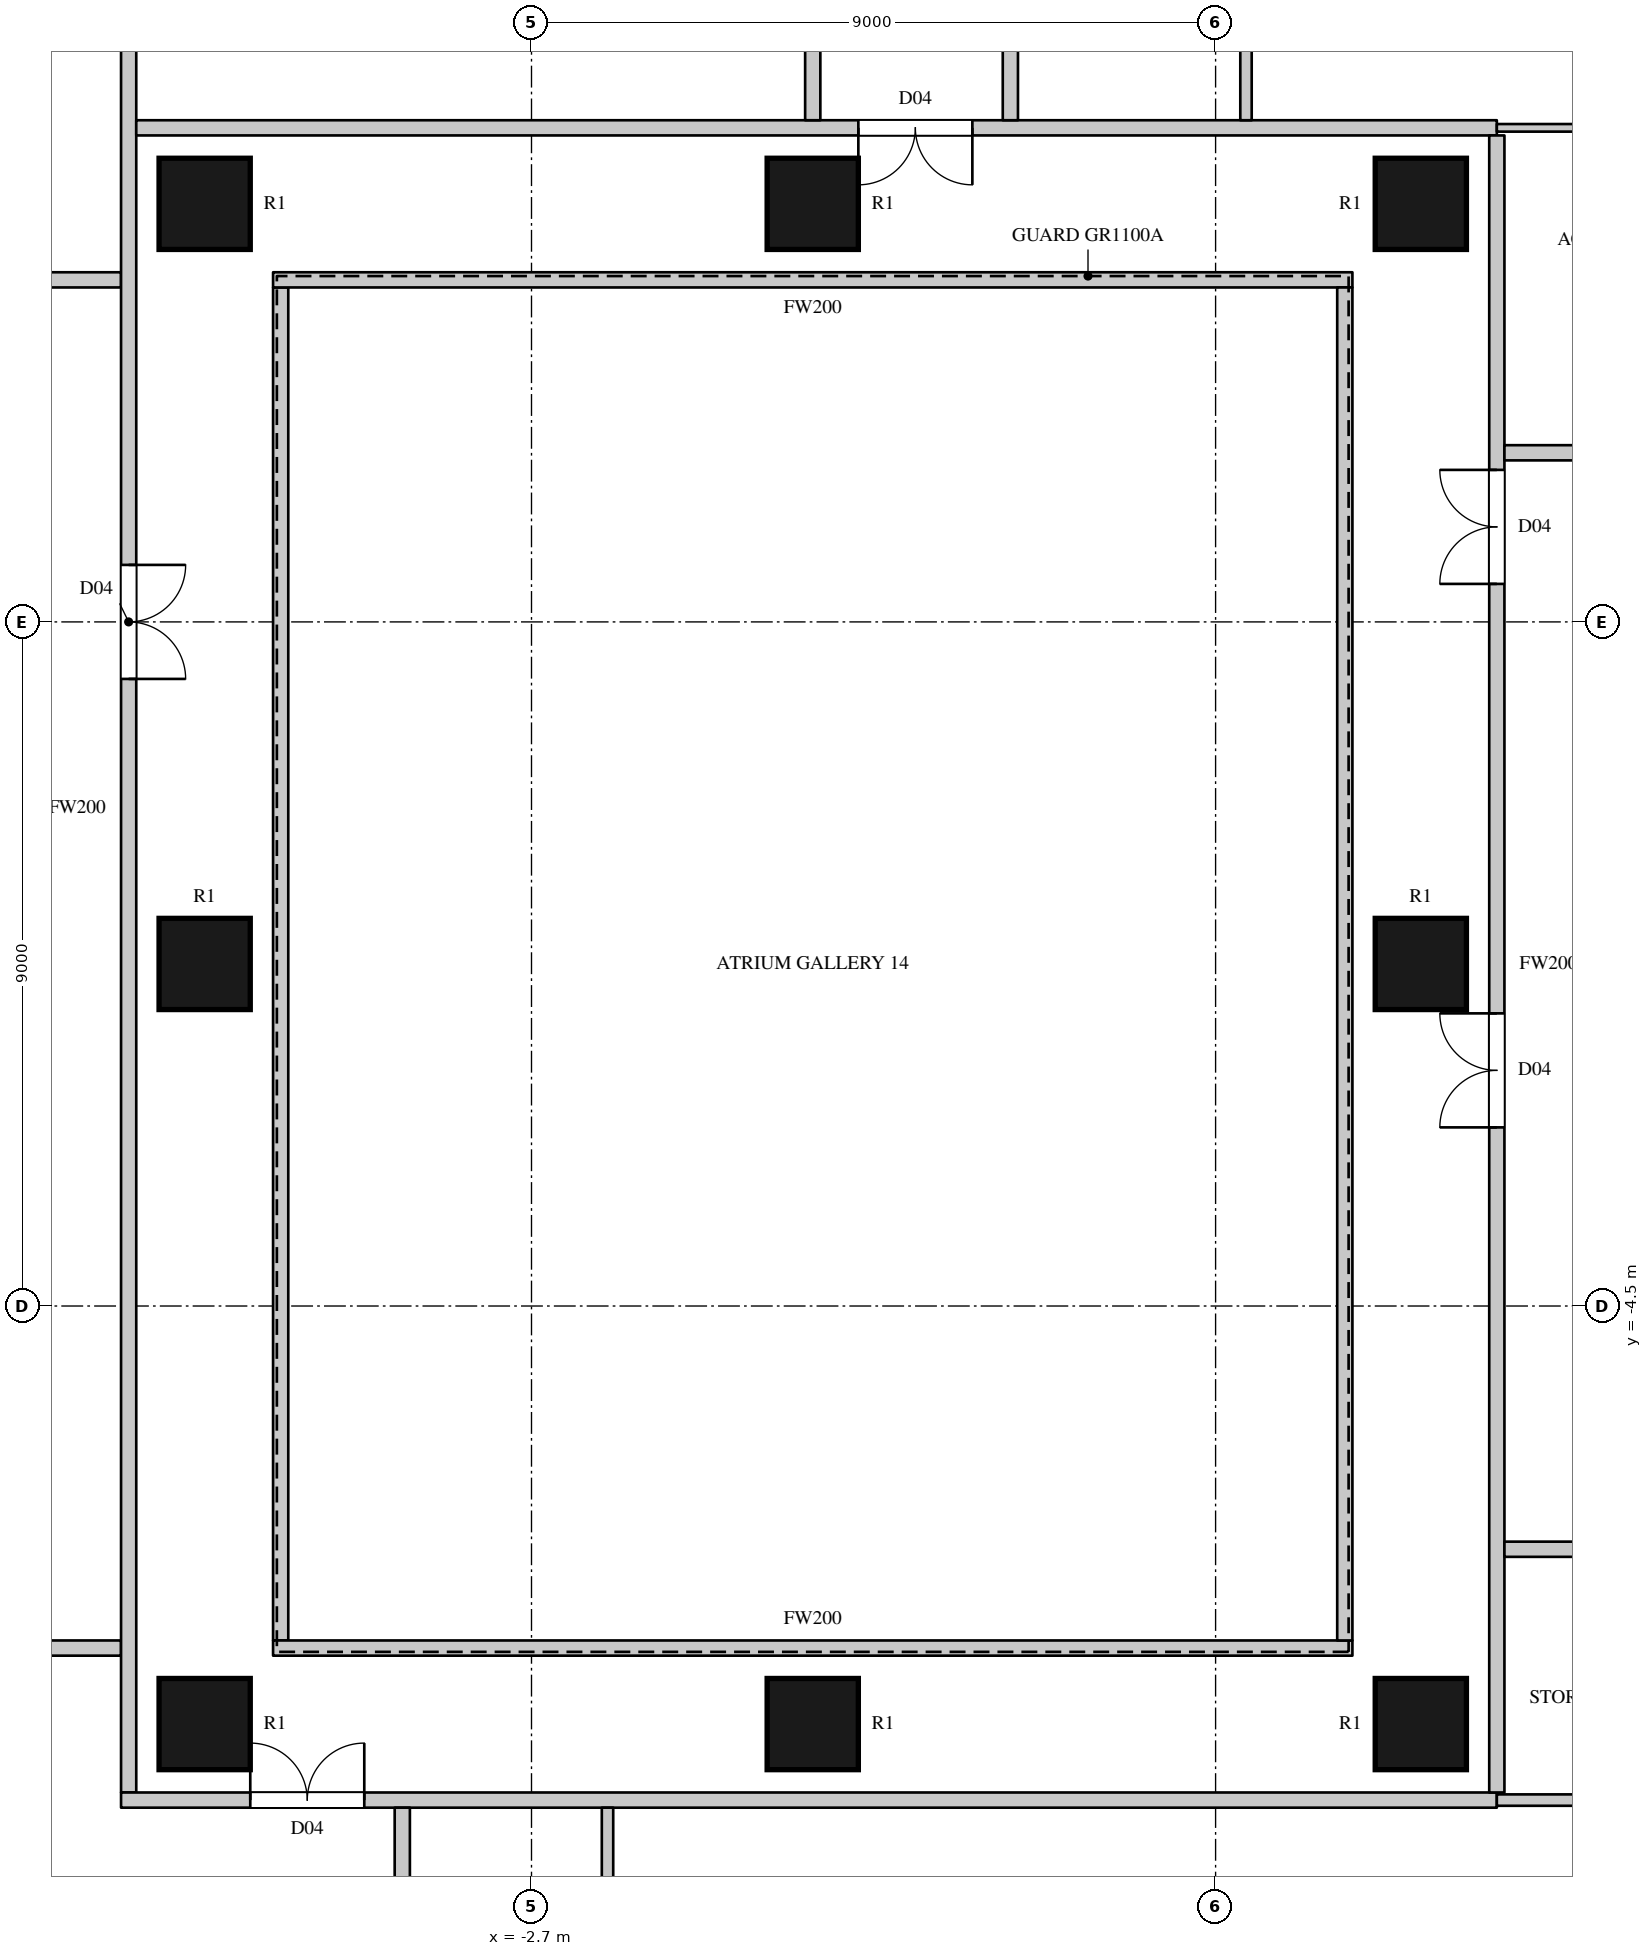
"""IFC4 building model, lengths in metres.
Left out: names, types, materials, properties, quantities, classifications, styles, units other than length and angle.
Written with IfcOpenShell. Run it as: python <this file> out.ifc"""

import sys

from ifc_helpers import new_model, si_unit, direction, frame, frame_2d, origin, origin_2d, place, context, subcontext, project, spatial, rectangle, circle, extrude, element, fill, save


model = new_model("IFC4")
c1 = context("Model", 3, precision=1e-05, world=origin(), true_north=direction((0.0, 1.0)))
c2 = subcontext(c1, "Body", "Model", "MODEL_VIEW")
j1 = project(units=[si_unit("LENGTHUNIT", "METRE"), si_unit("PLANEANGLEUNIT", "RADIAN")], contexts=[c1])
p1 = place(None, origin())
s1 = spatial("IfcSite", under=j1, at=p1, CompositionType="ELEMENT")
p2 = place(p1, origin())
s2 = spatial("IfcBuilding", under=s1, at=p2, CompositionType="ELEMENT")
p3 = place(p2, frame((0.0, 0.0, 80.7)))
s3 = spatial("IfcBuildingStorey", under=s2, at=p3, CompositionType="ELEMENT", Elevation=80.7)
for number, where, z_axis, x_axis in (
    (1, (-7.0, -10.0, 0.0), (0.0, 0.0, 1.0), (1.0, 0.0, 0.0)),
    (2, (-7.0, 0.0, 0.0), (0.0, 0.0, 1.0), (1.0, 0.0, 0.0)),
    (3, (-7.0, 10.0, 0.0), (0.0, 0.0, 1.0), (1.0, 0.0, 0.0)),
    (4, (1.0, -10.0, 0.0), (0.0, 0.0, 1.0), (1.0, 0.0, 0.0)),
    (5, (1.0, 10.0, 0.0), (0.0, 0.0, 1.0), (1.0, 0.0, 0.0)),
    (6, (9.0, -10.0, 0.0), (0.0, 0.0, 1.0), (1.0, 0.0, 0.0)),
    (7, (9.0, 0.0, 0.0), (0.0, 0.0, 1.0), (1.0, 0.0, 0.0)),
    (8, (9.0, 10.0, 0.0), (0.0, 0.0, 1.0), (1.0, 0.0, 0.0)),
):
    element("IfcColumn", number, at=place(p3, frame(where, z_axis=z_axis, x_axis=x_axis)), inside=s3, PredefinedType="COLUMN", context=c2, shape_type="SweptSolid", body=[
        extrude(circle(Radius=0.6, at=origin_2d()), origin(), (0.0, 0.0, 1.0), 3.6),
    ])
p4 = place(p3, frame((-13.97, -9.0, 0.0), z_axis=(0.0, 0.0, 1.0), x_axis=(1.0, 0.0, 0.0)))
e9 = element("IfcWall", 9, at=p4, inside=s3, PredefinedType="PARTITIONING", context=c2, shape_type="SweptSolid", body=[
    extrude(rectangle(XDim=5.87, YDim=0.2, at=frame_2d((2.935, 0.0))), origin(), (0.0, 0.0, 1.0), 3.3),
])
p5 = place(p4, frame((0.4, 0.0, 0.0)))
e10 = element("IfcOpeningElement", 10, at=p5, cuts=e9, PredefinedType="OPENING", context=c2, shape_type="SweptSolid", body=[
    extrude(rectangle(XDim=1.5, YDim=2.2, at=frame_2d((0.75, 1.1))), frame((0.0, 0.11, 0.0), z_axis=(0.0, -1.0, 0.0), x_axis=(1.0, 0.0, 0.0)), (0.0, 0.0, 1.0), 0.22),
])
p6 = place(p4, frame((2.05, 0.0, 0.0)))
e11 = element("IfcOpeningElement", 11, at=p6, cuts=e9, PredefinedType="OPENING", context=c2, shape_type="SweptSolid", body=[
    extrude(rectangle(XDim=1.5, YDim=2.2, at=frame_2d((0.75, 1.1))), frame((0.0, 0.11, 0.0), z_axis=(0.0, -1.0, 0.0), x_axis=(1.0, 0.0, 0.0)), (0.0, 0.0, 1.0), 0.22),
])
p7 = place(p3, frame((-13.97, 9.0, 0.0), z_axis=(0.0, 0.0, 1.0), x_axis=(1.0, 0.0, 0.0)))
e12 = element("IfcWall", 12, at=p7, inside=s3, PredefinedType="PARTITIONING", context=c2, shape_type="SweptSolid", body=[
    extrude(rectangle(XDim=5.87, YDim=0.2, at=frame_2d((2.935, 0.0))), origin(), (0.0, 0.0, 1.0), 3.3),
])
p8 = place(p3, frame((-8.0, -10.9, 0.0), z_axis=(0.0, 0.0, 1.0), x_axis=(0.0, 1.0, 0.0)))
e13 = element("IfcWall", 13, at=p8, inside=s3, PredefinedType="PARTITIONING", context=c2, shape_type="SweptSolid", body=[
    extrude(rectangle(XDim=25.9, YDim=0.2, at=frame_2d((12.95, 0.0))), origin(), (0.0, 0.0, 1.0), 3.3),
])
p9 = place(p8, frame((14.65, 0.0, 0.0)))
e14 = element("IfcOpeningElement", 14, at=p9, cuts=e13, PredefinedType="OPENING", context=c2, shape_type="SweptSolid", body=[
    extrude(rectangle(XDim=1.5, YDim=2.2, at=frame_2d((0.75, 1.1))), frame((0.0, 0.11, 0.0), z_axis=(0.0, -1.0, 0.0), x_axis=(1.0, 0.0, 0.0)), (0.0, 0.0, 1.0), 0.22),
])
p10 = place(p8, frame((24.15, 0.0, 0.0)))
e15 = element("IfcOpeningElement", 15, at=p10, cuts=e13, PredefinedType="OPENING", context=c2, shape_type="SweptSolid", body=[
    extrude(rectangle(XDim=1.6, YDim=2.4, at=frame_2d((0.8, 1.2))), frame((0.0, 0.11, 0.0), z_axis=(0.0, -1.0, 0.0), x_axis=(1.0, 0.0, 0.0)), (0.0, 0.0, 1.0), 0.22),
])
p11 = place(p3, frame((-8.1, -11.0, 0.0), z_axis=(0.0, 0.0, 1.0), x_axis=(1.0, 0.0, 0.0)))
e16 = element("IfcWall", 16, at=p11, inside=s3, PredefinedType="PARTITIONING", context=c2, shape_type="SweptSolid", body=[
    extrude(rectangle(XDim=18.1, YDim=0.2, at=frame_2d((9.05, 0.0))), origin(), (0.0, 0.0, 1.0), 3.3),
])
p12 = place(p11, frame((1.7, 0.0, 0.0)))
e17 = element("IfcOpeningElement", 17, at=p12, cuts=e16, PredefinedType="OPENING", context=c2, shape_type="SweptSolid", body=[
    extrude(rectangle(XDim=1.5, YDim=2.2, at=frame_2d((0.75, 1.1))), frame((0.0, 0.11, 0.0), z_axis=(0.0, -1.0, 0.0), x_axis=(1.0, 0.0, 0.0)), (0.0, 0.0, 1.0), 0.22),
])
p13 = place(p3, frame((-7.9, 11.0, 0.0), z_axis=(0.0, 0.0, 1.0), x_axis=(1.0, 0.0, 0.0)))
e18 = element("IfcWall", 18, at=p13, inside=s3, PredefinedType="PARTITIONING", context=c2, shape_type="SweptSolid", body=[
    extrude(rectangle(XDim=17.9, YDim=0.2, at=frame_2d((8.95, 0.0))), origin(), (0.0, 0.0, 1.0), 3.3),
])
p14 = place(p13, frame((9.5, 0.0, 0.0)))
e19 = element("IfcOpeningElement", 19, at=p14, cuts=e18, PredefinedType="OPENING", context=c2, shape_type="SweptSolid", body=[
    extrude(rectangle(XDim=1.5, YDim=2.2, at=frame_2d((0.75, 1.1))), frame((0.0, 0.11, 0.0), z_axis=(0.0, -1.0, 0.0), x_axis=(1.0, 0.0, 0.0)), (0.0, 0.0, 1.0), 0.22),
])
p15 = place(p3, frame((-6.0, -8.9, 0.0), z_axis=(0.0, 0.0, 1.0), x_axis=(0.0, 1.0, 0.0)))
e20 = element("IfcWall", 20, at=p15, inside=s3, PredefinedType="PARTITIONING", context=c2, shape_type="SweptSolid", body=[
    extrude(rectangle(XDim=17.8, YDim=0.2, at=frame_2d((8.9, 0.0))), origin(), (0.0, 0.0, 1.0), 3.3),
])
for number, where, z_axis, x_axis in (
    (21, (-6.1, -9.0, 0.0), (0.0, 0.0, 1.0), (1.0, 0.0, 0.0)),
    (22, (-6.1, 9.0, 0.0), (0.0, 0.0, 1.0), (1.0, 0.0, 0.0)),
):
    element("IfcWall", number, at=place(p3, frame(where, z_axis=z_axis, x_axis=x_axis)), inside=s3, PredefinedType="PARTITIONING", context=c2, shape_type="SweptSolid", body=[
        extrude(rectangle(XDim=14.2, YDim=0.2, at=frame_2d((7.1, 0.0))), origin(), (0.0, 0.0, 1.0), 3.3),
    ])
p16 = place(p3, frame((-4.4, -15.0, 0.0), z_axis=(0.0, 0.0, 1.0), x_axis=(0.0, 1.0, 0.0)))
e23 = element("IfcWall", 23, at=p16, inside=s3, PredefinedType="PARTITIONING", context=c2, shape_type="SweptSolid", body=[
    extrude(rectangle(XDim=3.9, YDim=0.2, at=frame_2d((1.95, 0.0))), origin(), (0.0, 0.0, 1.0), 3.3),
])
p17 = place(p16, frame((0.15, 0.0, 0.0)))
e24 = element("IfcOpeningElement", 24, at=p17, cuts=e23, PredefinedType="OPENING", context=c2, shape_type="SweptSolid", body=[
    extrude(rectangle(XDim=0.9, YDim=2.2, at=frame_2d((0.45, 1.1))), frame((0.0, 0.11, 0.0), z_axis=(0.0, -1.0, 0.0), x_axis=(1.0, 0.0, 0.0)), (0.0, 0.0, 1.0), 0.22),
])
p18 = place(p3, frame((1.0, 11.1, 0.0), z_axis=(0.0, 0.0, 1.0), x_axis=(0.0, 1.0, 0.0)))
e25 = element("IfcWall", 25, at=p18, inside=s3, PredefinedType="PARTITIONING", context=c2, shape_type="SweptSolid", body=[
    extrude(rectangle(XDim=3.9, YDim=0.2, at=frame_2d((1.95, 0.0))), origin(), (0.0, 0.0, 1.0), 3.3),
])
p19 = place(p3, frame((3.6, 11.1, 0.0), z_axis=(0.0, 0.0, 1.0), x_axis=(0.0, 1.0, 0.0)))
e26 = element("IfcWall", 26, at=p19, inside=s3, PredefinedType="PARTITIONING", context=c2, shape_type="SweptSolid", body=[
    extrude(rectangle(XDim=3.9, YDim=0.2, at=frame_2d((1.95, 0.0))), origin(), (0.0, 0.0, 1.0), 3.3),
])
p20 = place(p19, frame((2.8, 0.0, 0.0)))
e27 = element("IfcOpeningElement", 27, at=p20, cuts=e26, PredefinedType="OPENING", context=c2, shape_type="SweptSolid", body=[
    extrude(rectangle(XDim=0.95, YDim=2.2, at=frame_2d((0.475, 1.1))), frame((0.0, 0.11, 0.0), z_axis=(0.0, -1.0, 0.0), x_axis=(1.0, 0.0, 0.0)), (0.0, 0.0, 1.0), 0.22),
])
p21 = place(p3, frame((8.0, -8.9, 0.0), z_axis=(0.0, 0.0, 1.0), x_axis=(0.0, 1.0, 0.0)))
e28 = element("IfcWall", 28, at=p21, inside=s3, PredefinedType="PARTITIONING", context=c2, shape_type="SweptSolid", body=[
    extrude(rectangle(XDim=17.8, YDim=0.2, at=frame_2d((8.9, 0.0))), origin(), (0.0, 0.0, 1.0), 3.3),
])
p22 = place(p3, frame((10.0, -10.9, 0.0), z_axis=(0.0, 0.0, 1.0), x_axis=(0.0, 1.0, 0.0)))
e29 = element("IfcWall", 29, at=p22, inside=s3, PredefinedType="PARTITIONING", context=c2, shape_type="SweptSolid", body=[
    extrude(rectangle(XDim=21.8, YDim=0.2, at=frame_2d((10.9, 0.0))), origin(), (0.0, 0.0, 1.0), 3.3),
])
p23 = place(p22, frame((15.9, 0.0, 0.0)))
e30 = element("IfcOpeningElement", 30, at=p23, cuts=e29, PredefinedType="OPENING", context=c2, shape_type="SweptSolid", body=[
    extrude(rectangle(XDim=1.5, YDim=2.2, at=frame_2d((0.75, 1.1))), frame((0.0, 0.11, 0.0), z_axis=(0.0, -1.0, 0.0), x_axis=(1.0, 0.0, 0.0)), (0.0, 0.0, 1.0), 0.22),
])
p24 = place(p22, frame((8.75, 0.0, 0.0)))
e31 = element("IfcOpeningElement", 31, at=p24, cuts=e29, PredefinedType="OPENING", context=c2, shape_type="SweptSolid", body=[
    extrude(rectangle(XDim=1.5, YDim=2.2, at=frame_2d((0.75, 1.1))), frame((0.0, 0.11, 0.0), z_axis=(0.0, -1.0, 0.0), x_axis=(1.0, 0.0, 0.0)), (0.0, 0.0, 1.0), 0.22),
])
p25 = place(p3, frame((10.1, -7.7, 0.0), z_axis=(0.0, 0.0, 1.0), x_axis=(1.0, 0.0, 0.0)))
e32 = element("IfcWall", 32, at=p25, inside=s3, PredefinedType="PARTITIONING", context=c2, shape_type="SweptSolid", body=[
    extrude(rectangle(XDim=3.7, YDim=0.2, at=frame_2d((1.85, 0.0))), origin(), (0.0, 0.0, 1.0), 3.3),
])
p26 = place(p25, frame((2.45, 0.0, 0.0)))
e33 = element("IfcOpeningElement", 33, at=p26, cuts=e32, PredefinedType="OPENING", context=c2, shape_type="SweptSolid", body=[
    extrude(rectangle(XDim=0.9, YDim=2.2, at=frame_2d((0.45, 1.1))), frame((0.0, 0.11, 0.0), z_axis=(0.0, -1.0, 0.0), x_axis=(1.0, 0.0, 0.0)), (0.0, 0.0, 1.0), 0.22),
])
p27 = place(p3, frame((10.1, 6.725, 0.0), z_axis=(0.0, 0.0, 1.0), x_axis=(1.0, 0.0, 0.0)))
e34 = element("IfcWall", 34, at=p27, inside=s3, PredefinedType="PARTITIONING", context=c2, shape_type="SweptSolid", body=[
    extrude(rectangle(XDim=3.7, YDim=0.2, at=frame_2d((1.85, 0.0))), origin(), (0.0, 0.0, 1.0), 3.3),
])
p28 = place(p27, frame((2.45, 0.0, 0.0)))
e35 = element("IfcOpeningElement", 35, at=p28, cuts=e34, PredefinedType="OPENING", context=c2, shape_type="SweptSolid", body=[
    extrude(rectangle(XDim=0.9, YDim=2.2, at=frame_2d((0.45, 1.1))), frame((0.0, 0.11, 0.0), z_axis=(0.0, -1.0, 0.0), x_axis=(1.0, 0.0, 0.0)), (0.0, 0.0, 1.0), 0.22),
])
for number, where, z_axis, x_axis in (
    (36, (-1.7, -15.0, 0.0), (0.0, 0.0, 1.0), (0.0, 1.0, 0.0)),
    (37, (6.7, 11.1, 0.0), (0.0, 0.0, 1.0), (0.0, 1.0, 0.0)),
):
    element("IfcWall", number, at=place(p3, frame(where, z_axis=z_axis, x_axis=x_axis)), inside=s3, PredefinedType="PARTITIONING", context=c2, shape_type="SweptSolid", body=[
        extrude(rectangle(XDim=3.9, YDim=0.15, at=frame_2d((1.95, 0.0))), origin(), (0.0, 0.0, 1.0), 3.3),
    ])
p29 = place(p3, frame((10.0, -11.0, 0.0), z_axis=(0.0, 0.0, 1.0), x_axis=(1.0, 0.0, 0.0)))
e38 = element("IfcWall", 38, at=p29, inside=s3, PredefinedType="PARTITIONING", context=c2, shape_type="SweptSolid", body=[
    extrude(rectangle(XDim=3.6, YDim=0.15, at=frame_2d((1.8, 0.0))), origin(), (0.0, 0.0, 1.0), 3.3),
])
p30 = place(p3, frame((10.0, 11.0, 0.0), z_axis=(0.0, 0.0, 1.0), x_axis=(1.0, 0.0, 0.0)))
e39 = element("IfcWall", 39, at=p30, inside=s3, PredefinedType="PARTITIONING", context=c2, shape_type="SweptSolid", body=[
    extrude(rectangle(XDim=3.6, YDim=0.1, at=frame_2d((1.8, 0.0))), origin(), (0.0, 0.0, 1.0), 3.3),
])
p31 = place(p9, origin())
e40 = element("IfcDoor", 40, at=p31, inside=s3, OperationType="DOUBLE_DOOR_SINGLE_SWING", PredefinedType="DOOR", context=c2, shape_type="SweptSolid", body=[
    extrude(rectangle(XDim=1.5, YDim=2.2, at=frame_2d((0.75, 1.1))), frame((0.0, 0.025, 0.0), z_axis=(0.0, -1.0, 0.0), x_axis=(1.0, 0.0, 0.0)), (0.0, 0.0, 1.0), 0.05),
])
fill(e14, e40)
p32 = place(p12, origin())
e41 = element("IfcDoor", 41, at=p32, inside=s3, OperationType="DOUBLE_DOOR_SINGLE_SWING", PredefinedType="DOOR", context=c2, shape_type="SweptSolid", body=[
    extrude(rectangle(XDim=1.5, YDim=2.2, at=frame_2d((0.75, 1.1))), frame((0.0, 0.025, 0.0), z_axis=(0.0, -1.0, 0.0), x_axis=(1.0, 0.0, 0.0)), (0.0, 0.0, 1.0), 0.05),
])
fill(e17, e41)
p33 = place(p14, origin())
e42 = element("IfcDoor", 42, at=p33, inside=s3, OperationType="DOUBLE_DOOR_SINGLE_SWING", PredefinedType="DOOR", context=c2, shape_type="SweptSolid", body=[
    extrude(rectangle(XDim=1.5, YDim=2.2, at=frame_2d((0.75, 1.1))), frame((0.0, 0.025, 0.0), z_axis=(0.0, -1.0, 0.0), x_axis=(1.0, 0.0, 0.0)), (0.0, 0.0, 1.0), 0.05),
])
fill(e19, e42)
p34 = place(p23, origin())
e43 = element("IfcDoor", 43, at=p34, inside=s3, OperationType="DOUBLE_DOOR_SINGLE_SWING", PredefinedType="DOOR", context=c2, shape_type="SweptSolid", body=[
    extrude(rectangle(XDim=1.5, YDim=2.2, at=frame_2d((0.75, 1.1))), frame((0.0, 0.025, 0.0), z_axis=(0.0, -1.0, 0.0), x_axis=(1.0, 0.0, 0.0)), (0.0, 0.0, 1.0), 0.05),
])
fill(e30, e43)
p35 = place(p24, origin())
e44 = element("IfcDoor", 44, at=p35, inside=s3, OperationType="DOUBLE_DOOR_SINGLE_SWING", PredefinedType="DOOR", context=c2, shape_type="SweptSolid", body=[
    extrude(rectangle(XDim=1.5, YDim=2.2, at=frame_2d((0.75, 1.1))), frame((0.0, 0.025, 0.0), z_axis=(0.0, -1.0, 0.0), x_axis=(1.0, 0.0, 0.0)), (0.0, 0.0, 1.0), 0.05),
])
fill(e31, e44)
save(model, sys.argv[1])
